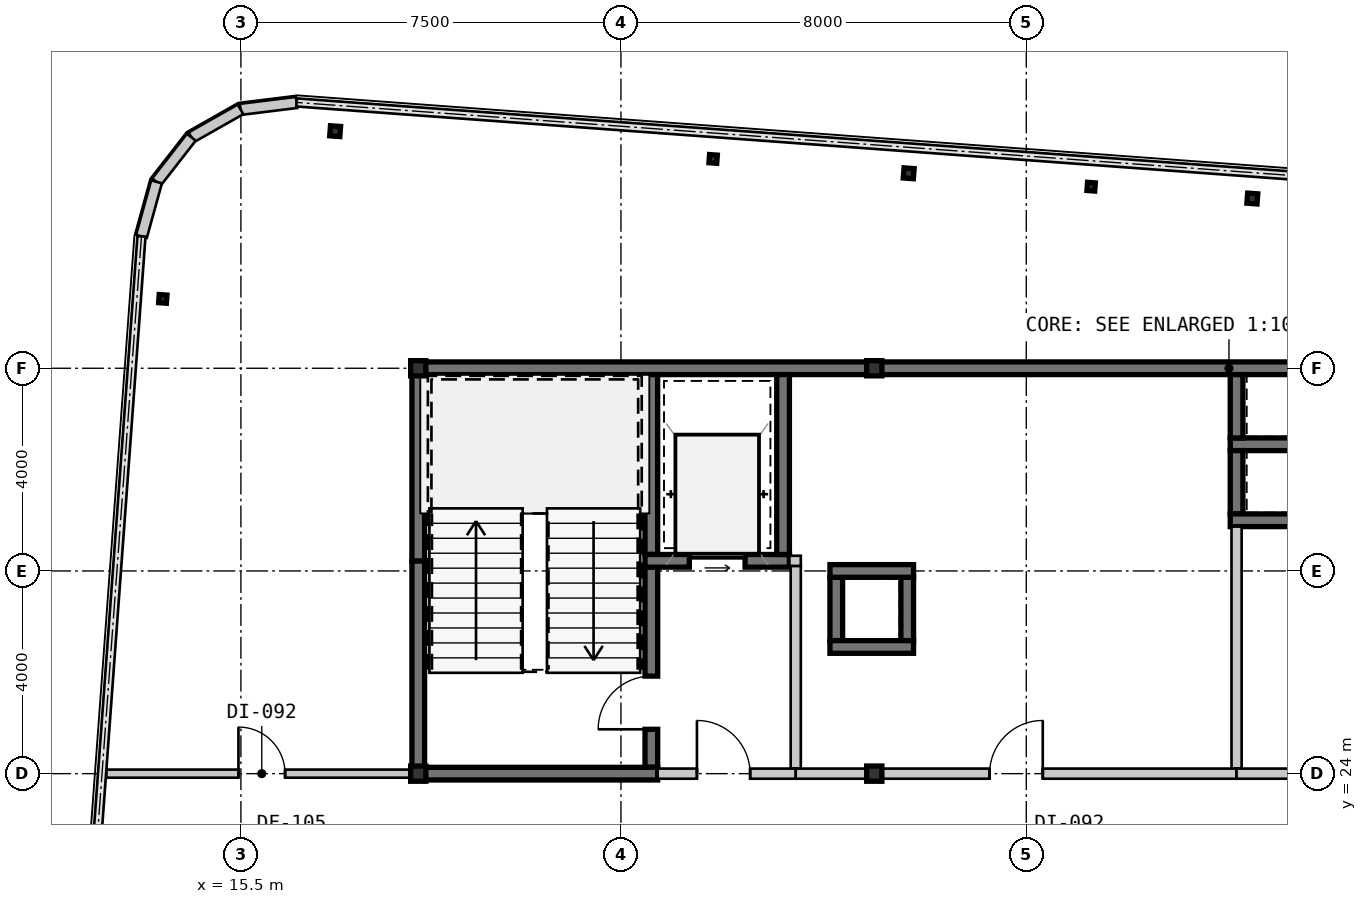
"""IFC4 building model, lengths in metres.
Left out: names, types, materials, properties, quantities, classifications, styles, units other than length and angle.
Written with IfcOpenShell. Run it as: python <this file> out.ifc"""

import sys

from ifc_helpers import new_model, si_unit, direction, frame, frame_2d, origin, origin_2d, place, context, subcontext, project, spatial, rectangle, hollow_rectangle, i_section, extrude, source, transform, mapped, element, fill, save


model = new_model("IFC4")
c1 = context("Model", 3, precision=1e-05, world=origin(), true_north=direction((0.0, 1.0)))
c2 = subcontext(c1, "Body", "Model", "MODEL_VIEW")
j1 = project(units=[si_unit("LENGTHUNIT", "METRE"), si_unit("PLANEANGLEUNIT", "RADIAN")], contexts=[c1])
p1 = place(None, origin())
s1 = spatial("IfcSite", under=j1, at=p1, CompositionType="ELEMENT")
p2 = place(p1, origin())
s2 = spatial("IfcBuilding", under=s1, at=p2, CompositionType="ELEMENT")
p3 = place(p2, frame((0.0, 0.0, 220.85)))
s3 = spatial("IfcBuildingStorey", under=s2, at=p3, CompositionType="ELEMENT", Elevation=220.85)
m1 = source(origin(), c2, "Body", "SweptSolid", [
    extrude(hollow_rectangle(XDim=0.3, YDim=0.3, WallThickness=0.012, at=origin_2d()), origin(), (0.0, 0.0, 1.0), 3.15),
])
for number, where, z_axis, x_axis in (
    (1, (19.0, 24.0, 0.0), (0.0, 0.0, 1.0), (1.0, 0.0, 0.0)),
    (2, (28.0, 24.0, 0.0), (0.0, 0.0, 1.0), (1.0, 0.0, 0.0)),
    (3, (19.0, 32.0, 0.0), (0.0, 0.0, 1.0), (1.0, 0.0, 0.0)),
    (4, (28.0, 32.0, 0.0), (0.0, 0.0, 1.0), (1.0, 0.0, 0.0)),
):
    element("IfcColumn", number, at=place(p3, frame(where, z_axis=z_axis, x_axis=x_axis)), inside=s3, PredefinedType="COLUMN", context=c2, shape_type="MappedRepresentation", body=[
        mapped(m1, transform((0.0, 0.0, 0.0), scale=1.0)),
    ])
m2 = source(origin(), c2, "Body", "SweptSolid", [
    extrude(hollow_rectangle(XDim=0.2, YDim=0.2, WallThickness=0.009, at=origin_2d()), origin(), (0.0, 0.0, 1.0), 3.15),
])
p4 = place(p3, frame((17.36, 36.679, 0.0), z_axis=(0.0, 0.0, 1.0), x_axis=(0.997314477224, -0.073238197128, 0.0)))
e5 = element("IfcColumn", 5, at=p4, inside=s3, PredefinedType="COLUMN", context=c2, shape_type="MappedRepresentation", body=[
    mapped(m2, transform((0.0, 0.0, 0.0), scale=1.0)),
])
m3 = source(origin(), c2, "Body", "SweptSolid", [
    extrude(i_section(OverallWidth=0.154, OverallDepth=0.162, WebThickness=0.008, FlangeThickness=0.011, at=origin_2d()), origin(), (0.0, 0.0, 1.0), 3.15),
])
for number, where, z_axis, x_axis in (
    (6, (24.82, 36.131, 0.0), (0.0, 0.0, 1.0), (0.997, -0.073, 0.0)),
    (7, (32.28, 35.583, 0.0), (0.0, 0.0, 1.0), (0.997, -0.073, 0.0)),
    (8, (13.958, 33.369, 0.0), (0.0, 0.0, 1.0), (0.997, -0.073, 0.0)),
):
    element("IfcColumn", number, at=place(p3, frame(where, z_axis=z_axis, x_axis=x_axis)), inside=s3, PredefinedType="COLUMN", context=c2, shape_type="MappedRepresentation", body=[
        mapped(m3, transform((0.0, 0.0, 0.0), scale=1.0)),
    ])
for number, where, z_axis, x_axis in (
    (9, (28.679, 35.848, 0.0), (0.0, 0.0, 1.0), (0.997, -0.073, 0.0)),
    (10, (35.461, 35.35, 0.0), (0.0, 0.0, 1.0), (0.997, -0.073, 0.0)),
):
    element("IfcColumn", number, at=place(p3, frame(where, z_axis=z_axis, x_axis=x_axis)), inside=s3, PredefinedType="COLUMN", context=c2, shape_type="MappedRepresentation", body=[
        mapped(m2, transform((0.0, 0.0, 0.0), scale=1.0)),
    ])
m4 = source(origin(), c2, "Body", "SweptSolid", [
    extrude(rectangle(XDim=1.116, YDim=0.22, at=frame_2d((0.558, 0.0))), origin(), (0.0, 0.0, 1.0), 2.93),
])
p5 = place(p3, frame((16.599, 37.246, 0.0), z_axis=(0.0, 0.0, 1.0), x_axis=(-0.992441899189, -0.122715429897, 0.0)))
e11 = element("IfcWall", 11, at=p5, inside=s3, PredefinedType="SOLIDWALL", context=c2, shape_type="MappedRepresentation", body=[
    mapped(m4, transform((0.0, 0.0, 0.0), scale=1.0)),
])
m5 = source(origin(), c2, "Body", "SweptSolid", [
    extrude(rectangle(XDim=1.116, YDim=0.22, at=frame_2d((0.558, 0.0))), origin(), (0.0, 0.0, 1.0), 2.93),
])
p6 = place(p3, frame((15.492, 37.109, 0.0), z_axis=(0.0, 0.0, 1.0), x_axis=(-0.869934579941, -0.493167138628, 0.0)))
e12 = element("IfcWall", 12, at=p6, inside=s3, PredefinedType="SOLIDWALL", context=c2, shape_type="MappedRepresentation", body=[
    mapped(m5, transform((0.0, 0.0, 0.0), scale=1.0)),
])
m6 = source(origin(), c2, "Body", "SweptSolid", [
    extrude(rectangle(XDim=1.116, YDim=0.22, at=frame_2d((0.558, 0.0))), origin(), (0.0, 0.0, 1.0), 2.93),
])
p7 = place(p3, frame((14.521, 36.559, 0.0), z_axis=(0.0, 0.0, 1.0), x_axis=(-0.614909386406, -0.788597772321, 0.0)))
e13 = element("IfcWall", 13, at=p7, inside=s3, PredefinedType="SOLIDWALL", context=c2, shape_type="MappedRepresentation", body=[
    mapped(m6, transform((0.0, 0.0, 0.0), scale=1.0)),
])
p8 = place(p3, frame((13.835, 35.679, 0.0), z_axis=(0.0, 0.0, 1.0), x_axis=(-0.266300605026, -0.963890028874, 0.0)))
e14 = element("IfcWall", 14, at=p8, inside=s3, PredefinedType="SOLIDWALL", context=c2, shape_type="MappedRepresentation", body=[
    mapped(m5, transform((0.0, 0.0, 0.0), scale=1.0)),
])
m7 = source(origin(), c2, "Body", "SweptSolid", [
    extrude(rectangle(XDim=9.125, YDim=0.25, at=frame_2d((4.562, 0.0))), origin(), (0.0, 0.0, 1.0), 2.93),
])
p9 = place(p3, frame((18.875, 32.0, 0.0), z_axis=(0.0, 0.0, 1.0), x_axis=(1.0, 0.0, 0.0)))
e15 = element("IfcWall", 15, at=p9, inside=s3, PredefinedType="SHEAR", context=c2, shape_type="MappedRepresentation", body=[
    mapped(m7, transform((0.0, 0.0, 0.0), scale=1.0)),
])
m8 = source(origin(), c2, "Body", "SweptSolid", [
    extrude(rectangle(XDim=11.2, YDim=0.25, at=frame_2d((5.6, 0.0))), origin(), (0.0, 0.0, 1.0), 2.93),
])
p10 = place(p3, frame((28.0, 32.0, 0.0), z_axis=(0.0, 0.0, 1.0), x_axis=(1.0, 0.0, 0.0)))
e16 = element("IfcWall", 16, at=p10, inside=s3, PredefinedType="SHEAR", context=c2, shape_type="MappedRepresentation", body=[
    mapped(m8, transform((0.0, 0.0, 0.0), scale=1.0)),
])
m9 = source(origin(), c2, "Body", "SweptSolid", [
    extrude(rectangle(XDim=4.075, YDim=0.25, at=frame_2d((2.038, 0.0))), origin(), (0.0, 0.0, 1.0), 2.93),
])
p11 = place(p3, frame((19.0, 24.125, 0.0), z_axis=(0.0, 0.0, 1.0), x_axis=(0.0, 1.0, 0.0)))
e17 = element("IfcWall", 17, at=p11, inside=s3, PredefinedType="SHEAR", context=c2, shape_type="MappedRepresentation", body=[
    mapped(m9, transform((0.0, 0.0, 0.0), scale=1.0)),
])
m10 = source(origin(), c2, "Body", "SweptSolid", [
    extrude(rectangle(XDim=3.675, YDim=0.25, at=frame_2d((1.837, 0.0))), origin(), (0.0, 0.0, 1.0), 2.93),
])
p12 = place(p3, frame((19.0, 28.2, 0.0), z_axis=(0.0, 0.0, 1.0), x_axis=(0.0, 1.0, 0.0)))
e18 = element("IfcWall", 18, at=p12, inside=s3, PredefinedType="SHEAR", context=c2, shape_type="MappedRepresentation", body=[
    mapped(m10, transform((0.0, 0.0, 0.0), scale=1.0)),
])
m11 = source(origin(), c2, "Body", "SweptSolid", [
    extrude(rectangle(XDim=3.55, YDim=0.25, at=frame_2d((1.775, 0.0))), origin(), (0.0, 0.0, 1.0), 2.93),
])
p13 = place(p3, frame((23.6, 28.325, 0.0), z_axis=(0.0, 0.0, 1.0), x_axis=(0.0, 1.0, 0.0)))
e19 = element("IfcWall", 19, at=p13, inside=s3, PredefinedType="SHEAR", context=c2, shape_type="MappedRepresentation", body=[
    mapped(m11, transform((0.0, 0.0, 0.0), scale=1.0)),
])
m12 = source(origin(), c2, "Body", "SweptSolid", [
    extrude(rectangle(XDim=3.95, YDim=0.25, at=frame_2d((1.975, 0.0))), origin(), (0.0, 0.0, 1.0), 2.93),
])
p14 = place(p3, frame((23.6, 24.125, 0.0), z_axis=(0.0, 0.0, 1.0), x_axis=(0.0, 1.0, 0.0)))
e20 = element("IfcWall", 20, at=p14, inside=s3, PredefinedType="SHEAR", context=c2, shape_type="MappedRepresentation", body=[
    mapped(m12, transform((0.0, 0.0, 0.0), scale=1.0)),
])
m13 = source(origin(), c2, "Body", "SweptSolid", [
    extrude(rectangle(XDim=1.05, YDim=2.1, at=frame_2d((0.525, 1.05))), frame((0.0, 0.135, 0.0), z_axis=(0.0, -1.0, 0.0), x_axis=(1.0, 0.0, 0.0)), (0.0, 0.0, 1.0), 0.27),
])
p15 = place(p14, frame((0.75, 0.0, 0.0)))
e21 = element("IfcOpeningElement", 21, at=p15, cuts=e20, PredefinedType="OPENING", context=c2, shape_type="MappedRepresentation", body=[
    mapped(m13, transform((0.0, 0.0, 0.0), scale=1.0)),
])
m14 = source(origin(), c2, "Body", "SweptSolid", [
    extrude(rectangle(XDim=4.85, YDim=0.25, at=frame_2d((2.425, 0.0))), origin(), (0.0, 0.0, 1.0), 2.93),
])
p16 = place(p3, frame((18.875, 24.0, 0.0), z_axis=(0.0, 0.0, 1.0), x_axis=(1.0, 0.0, 0.0)))
e22 = element("IfcWall", 22, at=p16, inside=s3, PredefinedType="SHEAR", context=c2, shape_type="MappedRepresentation", body=[
    mapped(m14, transform((0.0, 0.0, 0.0), scale=1.0)),
])
m15 = source(origin(), c2, "Body", "SweptSolid", [
    extrude(rectangle(XDim=2.85, YDim=0.25, at=frame_2d((1.425, 0.0))), origin(), (0.0, 0.0, 1.0), 2.93),
])
p17 = place(p3, frame((23.475, 28.2, 0.0), z_axis=(0.0, 0.0, 1.0), x_axis=(1.0, 0.0, 0.0)))
e23 = element("IfcWall", 23, at=p17, inside=s3, PredefinedType="SHEAR", context=c2, shape_type="MappedRepresentation", body=[
    mapped(m15, transform((0.0, 0.0, 0.0), scale=1.0)),
])
m16 = source(origin(), c2, "Body", "SweptSolid", [
    extrude(rectangle(XDim=1.1, YDim=2.15, at=frame_2d((0.55, 1.075))), frame((0.0, 0.135, 0.0), z_axis=(0.0, -1.0, 0.0), x_axis=(1.0, 0.0, 0.0)), (0.0, 0.0, 1.0), 0.27),
])
p18 = place(p17, frame((0.875, 0.0, 0.0)))
e24 = element("IfcOpeningElement", 24, at=p18, cuts=e23, PredefinedType="OPENING", context=c2, shape_type="MappedRepresentation", body=[
    mapped(m16, transform((0.0, 0.0, 0.0), scale=1.0)),
])
p19 = place(p3, frame((26.2, 28.325, 0.0), z_axis=(0.0, 0.0, 1.0), x_axis=(0.0, 1.0, 0.0)))
e25 = element("IfcWall", 25, at=p19, inside=s3, PredefinedType="SHEAR", context=c2, shape_type="MappedRepresentation", body=[
    mapped(m11, transform((0.0, 0.0, 0.0), scale=1.0)),
])
m17 = source(origin(), c2, "Body", "SweptSolid", [
    extrude(rectangle(XDim=4.0, YDim=0.2, at=frame_2d((2.0, 0.0))), origin(), (0.0, 0.0, 1.0), 2.93),
])
p20 = place(p3, frame((26.45, 24.1, 0.0), z_axis=(0.0, 0.0, 1.0), x_axis=(0.0, 1.0, 0.0)))
e26 = element("IfcWall", 26, at=p20, inside=s3, PredefinedType="SOLIDWALL", context=c2, shape_type="MappedRepresentation", body=[
    mapped(m17, transform((0.0, 0.0, 0.0), scale=1.0)),
])
m18 = source(origin(), c2, "Body", "SweptSolid", [
    extrude(rectangle(XDim=2.725, YDim=0.2, at=frame_2d((1.362, 0.0))), origin(), (0.0, 0.0, 1.0), 2.47),
])
p21 = place(p3, frame((23.725, 24.0, 0.0), z_axis=(0.0, 0.0, 1.0), x_axis=(1.0, 0.0, 0.0)))
e27 = element("IfcWall", 27, at=p21, inside=s3, PredefinedType="SOLIDWALL", context=c2, shape_type="MappedRepresentation", body=[
    mapped(m18, transform((0.0, 0.0, 0.0), scale=1.0)),
])
m19 = source(origin(), c2, "Body", "SweptSolid", [
    extrude(rectangle(XDim=1.05, YDim=2.1, at=frame_2d((0.525, 1.05))), frame((0.0, 0.11, 0.0), z_axis=(0.0, -1.0, 0.0), x_axis=(1.0, 0.0, 0.0)), (0.0, 0.0, 1.0), 0.22),
])
p22 = place(p21, frame((0.775, 0.0, 0.0)))
e28 = element("IfcOpeningElement", 28, at=p22, cuts=e27, PredefinedType="OPENING", context=c2, shape_type="MappedRepresentation", body=[
    mapped(m19, transform((0.0, 0.0, 0.0), scale=1.0)),
])
m20 = source(origin(), c2, "Body", "SweptSolid", [
    extrude(rectangle(XDim=1.95, YDim=0.25, at=frame_2d((0.975, 0.0))), origin(), (0.0, 0.0, 1.0), 2.93),
])
p23 = place(p3, frame((35.025, 30.5, 0.0), z_axis=(0.0, 0.0, 1.0), x_axis=(1.0, 0.0, 0.0)))
e29 = element("IfcWall", 29, at=p23, inside=s3, PredefinedType="SHEAR", context=c2, shape_type="MappedRepresentation", body=[
    mapped(m20, transform((0.0, 0.0, 0.0), scale=1.0)),
])
m21 = source(origin(), c2, "Body", "SweptSolid", [
    extrude(rectangle(XDim=1.25, YDim=0.25, at=frame_2d((0.625, 0.0))), origin(), (0.0, 0.0, 1.0), 2.93),
])
for number, where, z_axis, x_axis in (
    (30, (35.15, 31.875, 0.0), (0.0, 0.0, 1.0), (0.0, -1.0, 0.0)),
    (31, (35.15, 30.375, 0.0), (0.0, 0.0, 1.0), (0.0, -1.0, 0.0)),
):
    element("IfcWall", number, at=place(p3, frame(where, z_axis=z_axis, x_axis=x_axis)), inside=s3, PredefinedType="SHEAR", context=c2, shape_type="MappedRepresentation", body=[
        mapped(m21, transform((0.0, 0.0, 0.0), scale=1.0)),
    ])
p24 = place(p3, frame((35.025, 29.0, 0.0), z_axis=(0.0, 0.0, 1.0), x_axis=(1.0, 0.0, 0.0)))
e32 = element("IfcWall", 32, at=p24, inside=s3, PredefinedType="SHEAR", context=c2, shape_type="MappedRepresentation", body=[
    mapped(m20, transform((0.0, 0.0, 0.0), scale=1.0)),
])
for number, where, z_axis, x_axis in (
    (33, (28.65, 26.625, 0.0), (0.0, 0.0, 1.0), (0.0, 1.0, 0.0)),
    (34, (27.25, 27.875, 0.0), (0.0, 0.0, 1.0), (0.0, -1.0, 0.0)),
):
    element("IfcWall", number, at=place(p3, frame(where, z_axis=z_axis, x_axis=x_axis)), inside=s3, PredefinedType="SHEAR", context=c2, shape_type="MappedRepresentation", body=[
        mapped(m21, transform((0.0, 0.0, 0.0), scale=1.0)),
    ])
m22 = source(origin(), c2, "Body", "SweptSolid", [
    extrude(rectangle(XDim=1.65, YDim=0.25, at=frame_2d((0.825, 0.0))), origin(), (0.0, 0.0, 1.0), 2.93),
])
for number, where, z_axis, x_axis in (
    (35, (28.775, 28.0, 0.0), (0.0, 0.0, 1.0), (-1.0, 0.0, 0.0)),
    (36, (27.125, 26.5, 0.0), (0.0, 0.0, 1.0), (1.0, 0.0, 0.0)),
):
    element("IfcWall", number, at=place(p3, frame(where, z_axis=z_axis, x_axis=x_axis)), inside=s3, PredefinedType="SHEAR", context=c2, shape_type="MappedRepresentation", body=[
        mapped(m22, transform((0.0, 0.0, 0.0), scale=1.0)),
    ])
m23 = source(origin(), c2, "Body", "SweptSolid", [
    extrude(rectangle(XDim=4.775, YDim=0.2, at=frame_2d((2.387, 0.0))), origin(), (0.0, 0.0, 1.0), 2.93),
])
p25 = place(p3, frame((35.15, 28.875, 0.0), z_axis=(0.0, 0.0, 1.0), x_axis=(0.0, -1.0, 0.0)))
e37 = element("IfcWall", 37, at=p25, inside=s3, PredefinedType="SOLIDWALL", context=c2, shape_type="MappedRepresentation", body=[
    mapped(m23, transform((0.0, 0.0, 0.0), scale=1.0)),
])
m24 = source(origin(), c2, "Body", "SweptSolid", [
    extrude(rectangle(XDim=8.7, YDim=0.2, at=frame_2d((4.35, 0.0))), origin(), (0.0, 0.0, 1.0), 2.47),
])
p26 = place(p3, frame((35.15, 24.0, 0.0), z_axis=(0.0, 0.0, 1.0), x_axis=(-1.0, 0.0, 0.0)))
e38 = element("IfcWall", 38, at=p26, inside=s3, PredefinedType="SOLIDWALL", context=c2, shape_type="MappedRepresentation", body=[
    mapped(m24, transform((0.0, 0.0, 0.0), scale=1.0)),
])
p27 = place(p26, frame((3.825, 0.0, 0.0)))
e39 = element("IfcOpeningElement", 39, at=p27, cuts=e38, PredefinedType="OPENING", context=c2, shape_type="MappedRepresentation", body=[
    mapped(m19, transform((0.0, 0.0, 0.0), scale=1.0)),
])
m25 = source(origin(), c2, "Body", "SweptSolid", [
    extrude(rectangle(XDim=4.05, YDim=0.2, at=frame_2d((2.025, 0.0))), origin(), (0.0, 0.0, 1.0), 2.47),
])
p28 = place(p3, frame((39.2, 24.0, 0.0), z_axis=(0.0, 0.0, 1.0), x_axis=(-1.0, 0.0, 0.0)))
e40 = element("IfcWall", 40, at=p28, inside=s3, PredefinedType="SOLIDWALL", context=c2, shape_type="MappedRepresentation", body=[
    mapped(m25, transform((0.0, 0.0, 0.0), scale=1.0)),
])
p29 = place(p28, frame((1.5, 0.0, 0.0)))
e41 = element("IfcOpeningElement", 41, at=p29, cuts=e40, PredefinedType="OPENING", context=c2, shape_type="MappedRepresentation", body=[
    mapped(m19, transform((0.0, 0.0, 0.0), scale=1.0)),
])
m26 = source(origin(), c2, "Body", "SweptSolid", [
    extrude(rectangle(XDim=6.032, YDim=0.16, at=frame_2d((3.016, 0.0))), origin(), (0.0, 0.0, 1.0), 2.93),
])
p30 = place(p3, frame((12.843, 24.0, 0.0), z_axis=(0.0, 0.0, 1.0), x_axis=(1.0, 0.0, 0.0)))
e42 = element("IfcWall", 42, at=p30, inside=s3, PredefinedType="PARTITIONING", context=c2, shape_type="MappedRepresentation", body=[
    mapped(m26, transform((0.0, 0.0, 0.0), scale=1.0)),
])
m27 = source(origin(), c2, "Body", "SweptSolid", [
    extrude(rectangle(XDim=0.92, YDim=2.1, at=frame_2d((0.46, 1.05))), frame((0.0, 0.09, 0.0), z_axis=(0.0, -1.0, 0.0), x_axis=(1.0, 0.0, 0.0)), (0.0, 0.0, 1.0), 0.18),
])
p31 = place(p30, frame((2.608, 0.0, 0.0)))
e43 = element("IfcOpeningElement", 43, at=p31, cuts=e42, PredefinedType="OPENING", context=c2, shape_type="MappedRepresentation", body=[
    mapped(m27, transform((0.0, 0.0, 0.0), scale=1.0)),
])
m28 = source(origin(), c2, "Body", "SweptSolid", [
    extrude(rectangle(XDim=0.225, YDim=0.2, at=frame_2d((0.113, 0.0))), origin(), (0.0, 0.0, 1.0), 2.93),
])
p32 = place(p3, frame((26.325, 28.2, 0.0), z_axis=(0.0, 0.0, 1.0), x_axis=(1.0, 0.0, 0.0)))
e44 = element("IfcWall", 44, at=p32, inside=s3, PredefinedType="SOLIDWALL", context=c2, shape_type="MappedRepresentation", body=[
    mapped(m28, transform((0.0, 0.0, 0.0), scale=1.0)),
])
m29 = source(origin(), c2, "Body", "SweptSolid", [
    extrude(rectangle(XDim=1.05, YDim=2.1, at=frame_2d((0.525, 1.05))), frame((0.0, 0.025, 0.0), z_axis=(0.0, -1.0, 0.0), x_axis=(1.0, 0.0, 0.0)), (0.0, 0.0, 1.0), 0.05),
])
p33 = place(p15, origin())
e45 = element("IfcDoor", 45, at=p33, inside=s3, OperationType="SINGLE_SWING_LEFT", PredefinedType="DOOR", context=c2, shape_type="MappedRepresentation", body=[
    mapped(m29, transform((0.0, 0.0, 0.0), scale=1.0)),
])
fill(e21, e45)
m30 = source(origin(), c2, "Body", "SweptSolid", [
    extrude(rectangle(XDim=1.1, YDim=2.15, at=frame_2d((0.55, 1.075))), frame((0.0, 0.025, 0.0), z_axis=(0.0, -1.0, 0.0), x_axis=(1.0, 0.0, 0.0)), (0.0, 0.0, 1.0), 0.05),
])
p34 = place(p18, origin())
e46 = element("IfcDoor", 46, at=p34, inside=s3, OperationType="SLIDING_TO_LEFT", PredefinedType="DOOR", context=c2, shape_type="MappedRepresentation", body=[
    mapped(m30, transform((0.0, 0.0, 0.0), scale=1.0)),
])
fill(e24, e46)
p35 = place(p22, origin())
e47 = element("IfcDoor", 47, at=p35, inside=s3, OperationType="SINGLE_SWING_LEFT", PredefinedType="DOOR", context=c2, shape_type="MappedRepresentation", body=[
    mapped(m29, transform((0.0, 0.0, 0.0), scale=1.0)),
])
fill(e28, e47)
p36 = place(p27, frame((1.05, 0.0, 0.0), z_axis=(0.0, 0.0, 1.0), x_axis=(-1.0, 0.0, 0.0)))
e48 = element("IfcDoor", 48, at=p36, inside=s3, OperationType="SINGLE_SWING_RIGHT", PredefinedType="DOOR", context=c2, shape_type="MappedRepresentation", body=[
    mapped(m29, transform((0.0, 0.0, 0.0), scale=1.0)),
])
fill(e39, e48)
m31 = source(origin(), c2, "Body", "SweptSolid", [
    extrude(rectangle(XDim=0.92, YDim=2.1, at=frame_2d((0.46, 1.05))), frame((0.0, 0.025, 0.0), z_axis=(0.0, -1.0, 0.0), x_axis=(1.0, 0.0, 0.0)), (0.0, 0.0, 1.0), 0.05),
])
p37 = place(p31, origin())
e49 = element("IfcDoor", 49, at=p37, inside=s3, OperationType="SINGLE_SWING_LEFT", PredefinedType="DOOR", context=c2, shape_type="MappedRepresentation", body=[
    mapped(m31, transform((0.0, 0.0, 0.0), scale=1.0)),
])
fill(e43, e49)
save(model, sys.argv[1])
